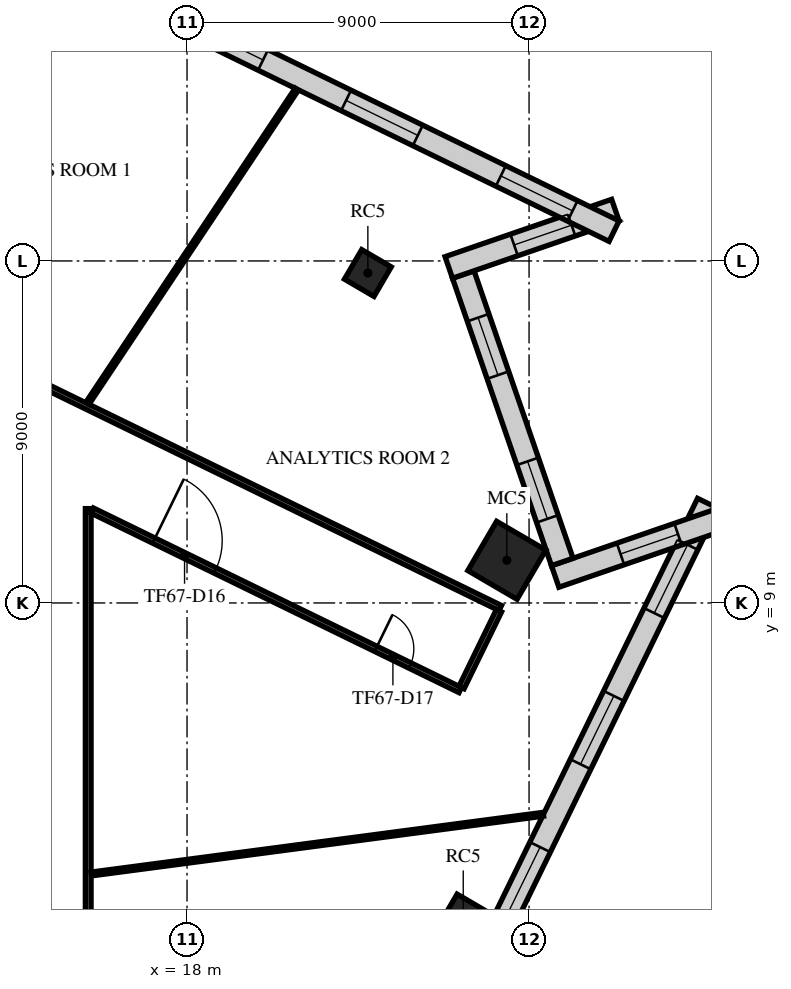
"""IFC4 building model, lengths in metres.
Left out: names, types, materials, properties, quantities, classifications, styles, units other than length and angle.
Written with IfcOpenShell. Run it as: python <this file> out.ifc"""

import sys

from ifc_helpers import new_model, si_unit, direction, frame, frame_2d, origin, origin_2d, place, context, subcontext, project, spatial, rectangle, extrude, element, fill, save


model = new_model("IFC4")
c1 = context("Model", 3, precision=1e-05, world=origin(), true_north=direction((0.0, 1.0)))
c2 = subcontext(c1, "Body", "Model", "MODEL_VIEW")
j1 = project(units=[si_unit("LENGTHUNIT", "METRE"), si_unit("PLANEANGLEUNIT", "RADIAN")], contexts=[c1])
p1 = place(None, origin())
s1 = spatial("IfcSite", under=j1, at=p1, CompositionType="ELEMENT")
p2 = place(p1, origin())
s2 = spatial("IfcBuilding", under=s1, at=p2, CompositionType="ELEMENT")
p3 = place(p2, frame((0.0, 0.0, 282.9)))
s3 = spatial("IfcBuildingStorey", under=s2, at=p3, CompositionType="ELEMENT", Elevation=282.9)
p4 = place(p3, frame((25.268, 0.722, 0.0), z_axis=(0.0, 0.0, 1.0), x_axis=(0.504643651291, 0.863327739165, 0.0)))
e1 = element("IfcColumn", 1, at=p4, inside=s3, PredefinedType="COLUMN", context=c2, shape_type="SweptSolid", body=[
    extrude(rectangle(XDim=0.9, YDim=0.9, at=origin_2d()), origin(), (0.0, 0.0, 1.0), 4.0),
])
p5 = place(p3, frame((26.415, 10.122, 0.0), z_axis=(0.0, 0.0, 1.0), x_axis=(0.504643651291, 0.863327739165, 0.0)))
e2 = element("IfcColumn", 2, at=p5, inside=s3, PredefinedType="COLUMN", context=c2, shape_type="SweptSolid", body=[
    extrude(rectangle(XDim=1.5, YDim=1.5, at=origin_2d()), origin(), (0.0, 0.0, 1.0), 4.0),
])
p6 = place(p3, frame((22.758, 17.682, 0.0), z_axis=(0.0, 0.0, 1.0), x_axis=(0.504643651291, 0.863327739165, 0.0)))
e3 = element("IfcColumn", 3, at=p6, inside=s3, PredefinedType="COLUMN", context=c2, shape_type="SweptSolid", body=[
    extrude(rectangle(XDim=0.9, YDim=0.9, at=origin_2d()), origin(), (0.0, 0.0, 1.0), 4.0),
])
p7 = place(p3, frame((10.36, -32.137, 0.0), z_axis=(0.0, 0.0, 1.0), x_axis=(0.438372256832, 0.898793504894, 0.0)))
e4 = element("IfcWall", 4, at=p7, inside=s3, PredefinedType="STANDARD", context=c2, shape_type="SweptSolid", body=[
    extrude(rectangle(XDim=48.687, YDim=0.6, at=frame_2d((24.343, 0.0))), origin(), (0.0, 0.0, 1.0), 3.64),
])
p8 = place(p7, frame((1.213, 0.0, 0.9)))
e5 = element("IfcOpeningElement", 5, at=p8, cuts=e4, PredefinedType="OPENING", context=c2, shape_type="SweptSolid", body=[
    extrude(rectangle(XDim=2.0, YDim=2.1, at=frame_2d((1.0, 1.05))), frame((0.0, 0.31, 0.0), z_axis=(0.0, -1.0, 0.0), x_axis=(1.0, 0.0, 0.0)), (0.0, 0.0, 1.0), 0.62),
])
p9 = place(p7, frame((5.639, 0.0, 0.9)))
e6 = element("IfcOpeningElement", 6, at=p9, cuts=e4, PredefinedType="OPENING", context=c2, shape_type="SweptSolid", body=[
    extrude(rectangle(XDim=2.0, YDim=2.1, at=frame_2d((1.0, 1.05))), frame((0.0, 0.31, 0.0), z_axis=(0.0, -1.0, 0.0), x_axis=(1.0, 0.0, 0.0)), (0.0, 0.0, 1.0), 0.62),
])
p10 = place(p7, frame((10.065, 0.0, 0.9)))
e7 = element("IfcOpeningElement", 7, at=p10, cuts=e4, PredefinedType="OPENING", context=c2, shape_type="SweptSolid", body=[
    extrude(rectangle(XDim=2.0, YDim=2.1, at=frame_2d((1.0, 1.05))), frame((0.0, 0.31, 0.0), z_axis=(0.0, -1.0, 0.0), x_axis=(1.0, 0.0, 0.0)), (0.0, 0.0, 1.0), 0.62),
])
p11 = place(p7, frame((14.491, 0.0, 0.9)))
e8 = element("IfcOpeningElement", 8, at=p11, cuts=e4, PredefinedType="OPENING", context=c2, shape_type="SweptSolid", body=[
    extrude(rectangle(XDim=2.0, YDim=2.1, at=frame_2d((1.0, 1.05))), frame((0.0, 0.31, 0.0), z_axis=(0.0, -1.0, 0.0), x_axis=(1.0, 0.0, 0.0)), (0.0, 0.0, 1.0), 0.62),
])
p12 = place(p7, frame((18.917, 0.0, 0.9)))
e9 = element("IfcOpeningElement", 9, at=p12, cuts=e4, PredefinedType="OPENING", context=c2, shape_type="SweptSolid", body=[
    extrude(rectangle(XDim=2.0, YDim=2.1, at=frame_2d((1.0, 1.05))), frame((0.0, 0.31, 0.0), z_axis=(0.0, -1.0, 0.0), x_axis=(1.0, 0.0, 0.0)), (0.0, 0.0, 1.0), 0.62),
])
p13 = place(p7, frame((23.343, 0.0, 0.9)))
e10 = element("IfcOpeningElement", 10, at=p13, cuts=e4, PredefinedType="OPENING", context=c2, shape_type="SweptSolid", body=[
    extrude(rectangle(XDim=2.0, YDim=2.1, at=frame_2d((1.0, 1.05))), frame((0.0, 0.31, 0.0), z_axis=(0.0, -1.0, 0.0), x_axis=(1.0, 0.0, 0.0)), (0.0, 0.0, 1.0), 0.62),
])
p14 = place(p7, frame((27.769, 0.0, 0.9)))
e11 = element("IfcOpeningElement", 11, at=p14, cuts=e4, PredefinedType="OPENING", context=c2, shape_type="SweptSolid", body=[
    extrude(rectangle(XDim=2.0, YDim=2.1, at=frame_2d((1.0, 1.05))), frame((0.0, 0.31, 0.0), z_axis=(0.0, -1.0, 0.0), x_axis=(1.0, 0.0, 0.0)), (0.0, 0.0, 1.0), 0.62),
])
p15 = place(p7, frame((32.195, 0.0, 0.9)))
e12 = element("IfcOpeningElement", 12, at=p15, cuts=e4, PredefinedType="OPENING", context=c2, shape_type="SweptSolid", body=[
    extrude(rectangle(XDim=2.0, YDim=2.1, at=frame_2d((1.0, 1.05))), frame((0.0, 0.31, 0.0), z_axis=(0.0, -1.0, 0.0), x_axis=(1.0, 0.0, 0.0)), (0.0, 0.0, 1.0), 0.62),
])
p16 = place(p7, frame((36.621, 0.0, 0.9)))
e13 = element("IfcOpeningElement", 13, at=p16, cuts=e4, PredefinedType="OPENING", context=c2, shape_type="SweptSolid", body=[
    extrude(rectangle(XDim=2.0, YDim=2.1, at=frame_2d((1.0, 1.05))), frame((0.0, 0.31, 0.0), z_axis=(0.0, -1.0, 0.0), x_axis=(1.0, 0.0, 0.0)), (0.0, 0.0, 1.0), 0.62),
])
p17 = place(p7, frame((41.047, 0.0, 0.9)))
e14 = element("IfcOpeningElement", 14, at=p17, cuts=e4, PredefinedType="OPENING", context=c2, shape_type="SweptSolid", body=[
    extrude(rectangle(XDim=2.0, YDim=2.1, at=frame_2d((1.0, 1.05))), frame((0.0, 0.31, 0.0), z_axis=(0.0, -1.0, 0.0), x_axis=(1.0, 0.0, 0.0)), (0.0, 0.0, 1.0), 0.62),
])
p18 = place(p7, frame((45.473, 0.0, 0.9)))
e15 = element("IfcOpeningElement", 15, at=p18, cuts=e4, PredefinedType="OPENING", context=c2, shape_type="SweptSolid", body=[
    extrude(rectangle(XDim=2.0, YDim=2.1, at=frame_2d((1.0, 1.05))), frame((0.0, 0.31, 0.0), z_axis=(0.0, -1.0, 0.0), x_axis=(1.0, 0.0, 0.0)), (0.0, 0.0, 1.0), 0.62),
])
p19 = place(p3, frame((32.07, 11.206, 0.0), z_axis=(0.0, 0.0, 1.0), x_axis=(-0.945524563242, -0.325550764561, 0.0)))
e16 = element("IfcWall", 16, at=p19, inside=s3, PredefinedType="STANDARD", context=c2, shape_type="SweptSolid", body=[
    extrude(rectangle(XDim=4.635, YDim=0.6, at=frame_2d((2.318, 0.0))), origin(), (0.0, 0.0, 1.0), 3.64),
])
p20 = place(p19, frame((1.218, 0.0, 0.9)))
e17 = element("IfcOpeningElement", 17, at=p20, cuts=e16, PredefinedType="OPENING", context=c2, shape_type="SweptSolid", body=[
    extrude(rectangle(XDim=1.6, YDim=2.1, at=frame_2d((0.8, 1.05))), frame((0.0, 0.31, 0.0), z_axis=(0.0, -1.0, 0.0), x_axis=(1.0, 0.0, 0.0)), (0.0, 0.0, 1.0), 0.62),
])
p21 = place(p3, frame((27.873, 10.079, 0.0), z_axis=(0.0, 0.0, 1.0), x_axis=(-0.325569297229, 0.945518182111, 0.0)))
e18 = element("IfcWall", 18, at=p21, inside=s3, PredefinedType="STANDARD", context=c2, shape_type="SweptSolid", body=[
    extrude(rectangle(XDim=8.0, YDim=0.6, at=frame_2d((4.0, 0.0))), origin(), (0.0, 0.0, 1.0), 3.64),
])
p22 = place(p21, frame((1.2, 0.0, 0.9)))
e19 = element("IfcOpeningElement", 19, at=p22, cuts=e18, PredefinedType="OPENING", context=c2, shape_type="SweptSolid", body=[
    extrude(rectangle(XDim=1.6, YDim=2.1, at=frame_2d((0.8, 1.05))), frame((0.0, 0.31, 0.0), z_axis=(0.0, -1.0, 0.0), x_axis=(1.0, 0.0, 0.0)), (0.0, 0.0, 1.0), 0.62),
])
p23 = place(p21, frame((5.2, 0.0, 0.9)))
e20 = element("IfcOpeningElement", 20, at=p23, cuts=e18, PredefinedType="OPENING", context=c2, shape_type="SweptSolid", body=[
    extrude(rectangle(XDim=1.6, YDim=2.1, at=frame_2d((0.8, 1.05))), frame((0.0, 0.31, 0.0), z_axis=(0.0, -1.0, 0.0), x_axis=(1.0, 0.0, 0.0)), (0.0, 0.0, 1.0), 0.62),
])
p24 = place(p3, frame((24.888, 17.829, 0.0), z_axis=(0.0, 0.0, 1.0), x_axis=(0.945508349791, 0.325597850847, 0.0)))
e21 = element("IfcWall", 21, at=p24, inside=s3, PredefinedType="STANDARD", context=c2, shape_type="SweptSolid", body=[
    extrude(rectangle(XDim=4.635, YDim=0.6, at=frame_2d((2.318, 0.0))), origin(), (0.0, 0.0, 1.0), 3.64),
])
p25 = place(p24, frame((1.818, 0.0, 0.9)))
e22 = element("IfcOpeningElement", 22, at=p25, cuts=e21, PredefinedType="OPENING", context=c2, shape_type="SweptSolid", body=[
    extrude(rectangle(XDim=1.6, YDim=2.1, at=frame_2d((0.8, 1.05))), frame((0.0, 0.31, 0.0), z_axis=(0.0, -1.0, 0.0), x_axis=(1.0, 0.0, 0.0)), (0.0, 0.0, 1.0), 0.62),
])
p26 = place(p3, frame((29.237, 18.785, 0.0), z_axis=(0.0, 0.0, 1.0), x_axis=(-0.898794534192, 0.438370146458, 0.0)))
e23 = element("IfcWall", 23, at=p26, inside=s3, PredefinedType="STANDARD", context=c2, shape_type="SweptSolid", body=[
    extrude(rectangle(XDim=36.243, YDim=0.6, at=frame_2d((18.122, 0.0))), origin(), (0.0, 0.0, 1.0), 3.64),
])
p27 = place(p26, frame((1.215, 0.0, 0.9)))
e24 = element("IfcOpeningElement", 24, at=p27, cuts=e23, PredefinedType="OPENING", context=c2, shape_type="SweptSolid", body=[
    extrude(rectangle(XDim=2.1, YDim=2.1, at=frame_2d((1.05, 1.05))), frame((0.0, 0.31, 0.0), z_axis=(0.0, -1.0, 0.0), x_axis=(1.0, 0.0, 0.0)), (0.0, 0.0, 1.0), 0.62),
])
p28 = place(p26, frame((5.746, 0.0, 0.9)))
e25 = element("IfcOpeningElement", 25, at=p28, cuts=e23, PredefinedType="OPENING", context=c2, shape_type="SweptSolid", body=[
    extrude(rectangle(XDim=2.1, YDim=2.1, at=frame_2d((1.05, 1.05))), frame((0.0, 0.31, 0.0), z_axis=(0.0, -1.0, 0.0), x_axis=(1.0, 0.0, 0.0)), (0.0, 0.0, 1.0), 0.62),
])
p29 = place(p26, frame((10.276, 0.0, 0.9)))
e26 = element("IfcOpeningElement", 26, at=p29, cuts=e23, PredefinedType="OPENING", context=c2, shape_type="SweptSolid", body=[
    extrude(rectangle(XDim=2.1, YDim=2.1, at=frame_2d((1.05, 1.05))), frame((0.0, 0.31, 0.0), z_axis=(0.0, -1.0, 0.0), x_axis=(1.0, 0.0, 0.0)), (0.0, 0.0, 1.0), 0.62),
])
p30 = place(p26, frame((14.806, 0.0, 0.9)))
e27 = element("IfcOpeningElement", 27, at=p30, cuts=e23, PredefinedType="OPENING", context=c2, shape_type="SweptSolid", body=[
    extrude(rectangle(XDim=2.1, YDim=2.1, at=frame_2d((1.05, 1.05))), frame((0.0, 0.31, 0.0), z_axis=(0.0, -1.0, 0.0), x_axis=(1.0, 0.0, 0.0)), (0.0, 0.0, 1.0), 0.62),
])
p31 = place(p26, frame((19.337, 0.0, 0.9)))
e28 = element("IfcOpeningElement", 28, at=p31, cuts=e23, PredefinedType="OPENING", context=c2, shape_type="SweptSolid", body=[
    extrude(rectangle(XDim=2.1, YDim=2.1, at=frame_2d((1.05, 1.05))), frame((0.0, 0.31, 0.0), z_axis=(0.0, -1.0, 0.0), x_axis=(1.0, 0.0, 0.0)), (0.0, 0.0, 1.0), 0.62),
])
p32 = place(p26, frame((23.867, 0.0, 0.9)))
e29 = element("IfcOpeningElement", 29, at=p32, cuts=e23, PredefinedType="OPENING", context=c2, shape_type="SweptSolid", body=[
    extrude(rectangle(XDim=2.1, YDim=2.1, at=frame_2d((1.05, 1.05))), frame((0.0, 0.31, 0.0), z_axis=(0.0, -1.0, 0.0), x_axis=(1.0, 0.0, 0.0)), (0.0, 0.0, 1.0), 0.62),
])
p33 = place(p26, frame((28.398, 0.0, 0.9)))
e30 = element("IfcOpeningElement", 30, at=p33, cuts=e23, PredefinedType="OPENING", context=c2, shape_type="SweptSolid", body=[
    extrude(rectangle(XDim=2.1, YDim=2.1, at=frame_2d((1.05, 1.05))), frame((0.0, 0.31, 0.0), z_axis=(0.0, -1.0, 0.0), x_axis=(1.0, 0.0, 0.0)), (0.0, 0.0, 1.0), 0.62),
])
p34 = place(p26, frame((32.928, 0.0, 0.9)))
e31 = element("IfcOpeningElement", 31, at=p34, cuts=e23, PredefinedType="OPENING", context=c2, shape_type="SweptSolid", body=[
    extrude(rectangle(XDim=2.1, YDim=2.1, at=frame_2d((1.05, 1.05))), frame((0.0, 0.31, 0.0), z_axis=(0.0, -1.0, 0.0), x_axis=(1.0, 0.0, 0.0)), (0.0, 0.0, 1.0), 0.62),
])
p35 = place(p3, frame((-9.104, 26.104, 0.0), z_axis=(0.0, 0.0, 1.0), x_axis=(0.898795233888, -0.438368711864, 0.0)))
e32 = element("IfcWall", 32, at=p35, inside=s3, PredefinedType="PARTITIONING", context=c2, shape_type="SweptSolid", body=[
    extrude(rectangle(XDim=39.325, YDim=0.15, at=frame_2d((19.663, 0.0))), origin(), (0.0, 0.0, 1.0), 3.04),
])
p36 = place(p35, frame((2.8, 0.0, 0.0)))
e33 = element("IfcOpeningElement", 33, at=p36, cuts=e32, PredefinedType="OPENING", context=c2, shape_type="SweptSolid", body=[
    extrude(rectangle(XDim=1.8, YDim=2.1, at=frame_2d((0.9, 1.05))), frame((0.0, 0.085, 0.0), z_axis=(0.0, -1.0, 0.0), x_axis=(1.0, 0.0, 0.0)), (0.0, 0.0, 1.0), 0.17),
])
p37 = place(p35, frame((15.419, 0.0, 0.0)))
e34 = element("IfcOpeningElement", 34, at=p37, cuts=e32, PredefinedType="OPENING", context=c2, shape_type="SweptSolid", body=[
    extrude(rectangle(XDim=1.0, YDim=2.1, at=frame_2d((0.5, 1.05))), frame((0.0, 0.085, 0.0), z_axis=(0.0, -1.0, 0.0), x_axis=(1.0, 0.0, 0.0)), (0.0, 0.0, 1.0), 0.17),
])
p38 = place(p35, frame((19.371, 0.0, 0.0)))
e35 = element("IfcOpeningElement", 35, at=p38, cuts=e32, PredefinedType="OPENING", context=c2, shape_type="SweptSolid", body=[
    extrude(rectangle(XDim=1.0, YDim=2.1, at=frame_2d((0.5, 1.05))), frame((0.0, 0.085, 0.0), z_axis=(0.0, -1.0, 0.0), x_axis=(1.0, 0.0, 0.0)), (0.0, 0.0, 1.0), 0.17),
])
p39 = place(p3, frame((15.4, -15.325, 0.0), z_axis=(0.0, 0.0, 1.0), x_axis=(0.0, 1.0, 0.0)))
e36 = element("IfcWall", 36, at=p39, inside=s3, PredefinedType="PARTITIONING", context=c2, shape_type="SweptSolid", body=[
    extrude(rectangle(XDim=26.808, YDim=0.15, at=frame_2d((13.404, 0.0))), origin(), (0.0, 0.0, 1.0), 3.24),
])
p40 = place(p39, frame((0.3, 0.0, 0.0)))
e37 = element("IfcOpeningElement", 37, at=p40, cuts=e36, PredefinedType="OPENING", context=c2, shape_type="SweptSolid", body=[
    extrude(rectangle(XDim=1.0, YDim=2.1, at=frame_2d((0.5, 1.05))), frame((0.0, 0.085, 0.0), z_axis=(0.0, -1.0, 0.0), x_axis=(1.0, 0.0, 0.0)), (0.0, 0.0, 1.0), 0.17),
])
p41 = place(p39, frame((14.072, 0.0, 0.0)))
e38 = element("IfcOpeningElement", 38, at=p41, cuts=e36, PredefinedType="OPENING", context=c2, shape_type="SweptSolid", body=[
    extrude(rectangle(XDim=1.0, YDim=2.1, at=frame_2d((0.5, 1.05))), frame((0.0, 0.085, 0.0), z_axis=(0.0, -1.0, 0.0), x_axis=(1.0, 0.0, 0.0)), (0.0, 0.0, 1.0), 0.17),
])
p42 = place(p3, frame((15.508, 11.43, 0.0), z_axis=(0.0, 0.0, 1.0), x_axis=(0.898789572526, -0.438380319264, 0.0)))
e39 = element("IfcWall", 39, at=p42, inside=s3, PredefinedType="PARTITIONING", context=c2, shape_type="SweptSolid", body=[
    extrude(rectangle(XDim=10.772, YDim=0.15, at=frame_2d((5.386, 0.0))), origin(), (0.0, 0.0, 1.0), 3.24),
])
p43 = place(p42, frame((1.8, 0.0, 0.0)))
e40 = element("IfcOpeningElement", 40, at=p43, cuts=e39, PredefinedType="OPENING", context=c2, shape_type="SweptSolid", body=[
    extrude(rectangle(XDim=1.8, YDim=2.1, at=frame_2d((0.9, 1.05))), frame((0.0, 0.085, 0.0), z_axis=(0.0, -1.0, 0.0), x_axis=(1.0, 0.0, 0.0)), (0.0, 0.0, 1.0), 0.17),
])
p44 = place(p42, frame((8.3, 0.0, 0.0)))
e41 = element("IfcOpeningElement", 41, at=p44, cuts=e39, PredefinedType="OPENING", context=c2, shape_type="SweptSolid", body=[
    extrude(rectangle(XDim=1.0, YDim=2.1, at=frame_2d((0.5, 1.05))), frame((0.0, 0.085, 0.0), z_axis=(0.0, -1.0, 0.0), x_axis=(1.0, 0.0, 0.0)), (0.0, 0.0, 1.0), 0.17),
])
p45 = place(p3, frame((25.223, 6.775, 0.0), z_axis=(0.0, 0.0, 1.0), x_axis=(0.438293210917, 0.898832053981, 0.0)))
e42 = element("IfcWall", 42, at=p45, inside=s3, PredefinedType="PARTITIONING", context=c2, shape_type="SweptSolid", body=[
    extrude(rectangle(XDim=2.25, YDim=0.15, at=frame_2d((1.125, 0.0))), origin(), (0.0, 0.0, 1.0), 3.04),
])
p46 = place(p3, frame((15.38, 14.254, 0.0), z_axis=(0.0, 0.0, 1.0), x_axis=(0.554513024901, 0.832175044816, 0.0)))
e43 = element("IfcWall", 43, at=p46, inside=s3, PredefinedType="PARTITIONING", context=c2, shape_type="SweptSolid", body=[
    extrude(rectangle(XDim=9.934, YDim=0.1, at=frame_2d((4.967, 0.0))), origin(), (0.0, 0.0, 1.0), 3.04),
])
p47 = place(p3, frame((15.482, 1.868, 0.0), z_axis=(0.0, 0.0, 1.0), x_axis=(0.991377248415, 0.131038739785, 0.0)))
e44 = element("IfcWall", 44, at=p47, inside=s3, PredefinedType="PARTITIONING", context=c2, shape_type="SweptSolid", body=[
    extrude(rectangle(XDim=11.999, YDim=0.1, at=frame_2d((5.999, 0.0))), origin(), (0.0, 0.0, 1.0), 3.04),
])
p48 = place(p16, origin())
e45 = element("IfcWindow", 45, at=p48, inside=s3, PartitioningType="SINGLE_PANEL", PredefinedType="WINDOW", context=c2, shape_type="SweptSolid", body=[
    extrude(rectangle(XDim=2.0, YDim=2.1, at=frame_2d((1.0, 1.05))), frame((0.0, 0.03, 0.0), z_axis=(0.0, -1.0, 0.0), x_axis=(1.0, 0.0, 0.0)), (0.0, 0.0, 1.0), 0.06),
])
fill(e13, e45)
p49 = place(p17, origin())
e46 = element("IfcWindow", 46, at=p49, inside=s3, PartitioningType="SINGLE_PANEL", PredefinedType="WINDOW", context=c2, shape_type="SweptSolid", body=[
    extrude(rectangle(XDim=2.0, YDim=2.1, at=frame_2d((1.0, 1.05))), frame((0.0, 0.03, 0.0), z_axis=(0.0, -1.0, 0.0), x_axis=(1.0, 0.0, 0.0)), (0.0, 0.0, 1.0), 0.06),
])
fill(e14, e46)
p50 = place(p18, origin())
e47 = element("IfcWindow", 47, at=p50, inside=s3, PartitioningType="SINGLE_PANEL", PredefinedType="WINDOW", context=c2, shape_type="SweptSolid", body=[
    extrude(rectangle(XDim=2.0, YDim=2.1, at=frame_2d((1.0, 1.05))), frame((0.0, 0.03, 0.0), z_axis=(0.0, -1.0, 0.0), x_axis=(1.0, 0.0, 0.0)), (0.0, 0.0, 1.0), 0.06),
])
fill(e15, e47)
p51 = place(p20, origin())
e48 = element("IfcWindow", 48, at=p51, inside=s3, PartitioningType="SINGLE_PANEL", PredefinedType="WINDOW", context=c2, shape_type="SweptSolid", body=[
    extrude(rectangle(XDim=1.6, YDim=2.1, at=frame_2d((0.8, 1.05))), frame((0.0, 0.03, 0.0), z_axis=(0.0, -1.0, 0.0), x_axis=(1.0, 0.0, 0.0)), (0.0, 0.0, 1.0), 0.06),
])
fill(e17, e48)
p52 = place(p22, origin())
e49 = element("IfcWindow", 49, at=p52, inside=s3, PartitioningType="SINGLE_PANEL", PredefinedType="WINDOW", context=c2, shape_type="SweptSolid", body=[
    extrude(rectangle(XDim=1.6, YDim=2.1, at=frame_2d((0.8, 1.05))), frame((0.0, 0.03, 0.0), z_axis=(0.0, -1.0, 0.0), x_axis=(1.0, 0.0, 0.0)), (0.0, 0.0, 1.0), 0.06),
])
fill(e19, e49)
p53 = place(p23, origin())
e50 = element("IfcWindow", 50, at=p53, inside=s3, PartitioningType="SINGLE_PANEL", PredefinedType="WINDOW", context=c2, shape_type="SweptSolid", body=[
    extrude(rectangle(XDim=1.6, YDim=2.1, at=frame_2d((0.8, 1.05))), frame((0.0, 0.03, 0.0), z_axis=(0.0, -1.0, 0.0), x_axis=(1.0, 0.0, 0.0)), (0.0, 0.0, 1.0), 0.06),
])
fill(e20, e50)
p54 = place(p25, origin())
e51 = element("IfcWindow", 51, at=p54, inside=s3, PartitioningType="SINGLE_PANEL", PredefinedType="WINDOW", context=c2, shape_type="SweptSolid", body=[
    extrude(rectangle(XDim=1.6, YDim=2.1, at=frame_2d((0.8, 1.05))), frame((0.0, 0.03, 0.0), z_axis=(0.0, -1.0, 0.0), x_axis=(1.0, 0.0, 0.0)), (0.0, 0.0, 1.0), 0.06),
])
fill(e22, e51)
p55 = place(p27, origin())
e52 = element("IfcWindow", 52, at=p55, inside=s3, PartitioningType="SINGLE_PANEL", PredefinedType="WINDOW", context=c2, shape_type="SweptSolid", body=[
    extrude(rectangle(XDim=2.1, YDim=2.1, at=frame_2d((1.05, 1.05))), frame((0.0, 0.03, 0.0), z_axis=(0.0, -1.0, 0.0), x_axis=(1.0, 0.0, 0.0)), (0.0, 0.0, 1.0), 0.06),
])
fill(e24, e52)
p56 = place(p28, origin())
e53 = element("IfcWindow", 53, at=p56, inside=s3, PartitioningType="SINGLE_PANEL", PredefinedType="WINDOW", context=c2, shape_type="SweptSolid", body=[
    extrude(rectangle(XDim=2.1, YDim=2.1, at=frame_2d((1.05, 1.05))), frame((0.0, 0.03, 0.0), z_axis=(0.0, -1.0, 0.0), x_axis=(1.0, 0.0, 0.0)), (0.0, 0.0, 1.0), 0.06),
])
fill(e25, e53)
p57 = place(p29, origin())
e54 = element("IfcWindow", 54, at=p57, inside=s3, PartitioningType="SINGLE_PANEL", PredefinedType="WINDOW", context=c2, shape_type="SweptSolid", body=[
    extrude(rectangle(XDim=2.1, YDim=2.1, at=frame_2d((1.05, 1.05))), frame((0.0, 0.03, 0.0), z_axis=(0.0, -1.0, 0.0), x_axis=(1.0, 0.0, 0.0)), (0.0, 0.0, 1.0), 0.06),
])
fill(e26, e54)
p58 = place(p43, frame((1.8, 0.0, 0.0), z_axis=(0.0, 0.0, 1.0), x_axis=(-1.0, 0.0, 0.0)))
e55 = element("IfcDoor", 55, at=p58, inside=s3, OperationType="DOUBLE_DOOR_SINGLE_SWING", PredefinedType="DOOR", context=c2, shape_type="SweptSolid", body=[
    extrude(rectangle(XDim=1.8, YDim=2.1, at=frame_2d((0.9, 1.05))), frame((0.0, 0.025, 0.0), z_axis=(0.0, -1.0, 0.0), x_axis=(1.0, 0.0, 0.0)), (0.0, 0.0, 1.0), 0.05),
])
fill(e40, e55)
p59 = place(p44, frame((1.0, 0.0, 0.0), z_axis=(0.0, 0.0, 1.0), x_axis=(-1.0, 0.0, 0.0)))
e56 = element("IfcDoor", 56, at=p59, inside=s3, OperationType="SINGLE_SWING_RIGHT", PredefinedType="DOOR", context=c2, shape_type="SweptSolid", body=[
    extrude(rectangle(XDim=1.0, YDim=2.1, at=frame_2d((0.5, 1.05))), frame((0.0, 0.025, 0.0), z_axis=(0.0, -1.0, 0.0), x_axis=(1.0, 0.0, 0.0)), (0.0, 0.0, 1.0), 0.05),
])
fill(e41, e56)
save(model, sys.argv[1])
